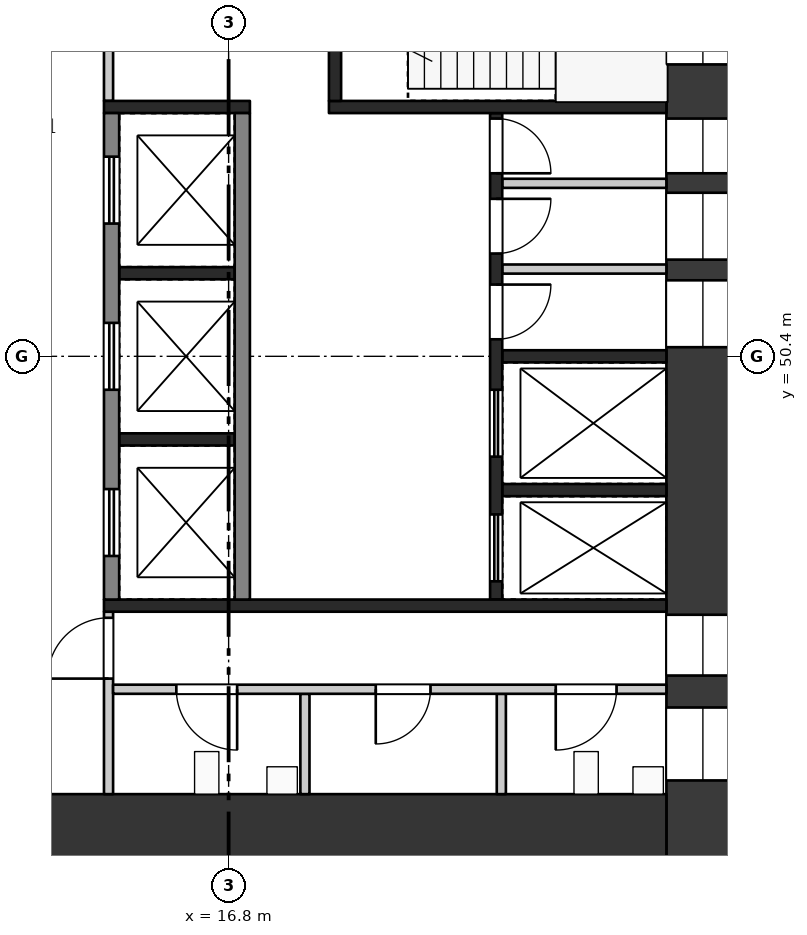
"""IFC4 building model, lengths in metres.
Left out: names, types, materials, properties, quantities, classifications, styles, units other than length and angle.
Written with IfcOpenShell. Run it as: python <this file> out.ifc"""

import sys

from ifc_helpers import new_model, si_unit, direction, frame, frame_2d, origin, place, context, subcontext, project, spatial, rectangle, extrude, element, fill, save


model = new_model("IFC4")
c1 = context("Model", 3, precision=1e-05, world=origin(), true_north=direction((0.0, 1.0)))
c2 = subcontext(c1, "Body", "Model", "MODEL_VIEW")
j1 = project(units=[si_unit("LENGTHUNIT", "METRE"), si_unit("PLANEANGLEUNIT", "RADIAN")], contexts=[c1])
p1 = place(None, origin())
s1 = spatial("IfcSite", under=j1, at=p1, CompositionType="ELEMENT")
p2 = place(p1, origin())
s2 = spatial("IfcBuilding", under=s1, at=p2, CompositionType="ELEMENT")
p3 = place(p2, frame((0.0, 0.0, 266.7)))
s3 = spatial("IfcBuildingStorey", under=s2, at=p3, CompositionType="ELEMENT", Elevation=266.7)
p4 = place(p3, frame((24.6, 58.8, 0.0), z_axis=(0.0, 0.0, 1.0), x_axis=(0.0, -1.0, 0.0)))
e1 = element("IfcWall", 1, at=p4, inside=s3, PredefinedType="SHEAR", context=c2, shape_type="SweptSolid", body=[
    extrude(rectangle(XDim=16.8, YDim=1.2, at=frame_2d((8.4, 0.0))), origin(), (0.0, 0.0, 1.0), 3.22),
])
p5 = place(p4, frame((1.8, 0.0, 0.5)))
e2 = element("IfcOpeningElement", 2, at=p5, cuts=e1, PredefinedType="OPENING", context=c2, shape_type="SweptSolid", body=[
    extrude(rectangle(XDim=1.8, YDim=2.4, at=frame_2d((0.9, 1.2))), frame((0.0, 0.61, 0.0), z_axis=(0.0, -1.0, 0.0), x_axis=(1.0, 0.0, 0.0)), (0.0, 0.0, 1.0), 1.22),
])
p6 = place(p4, frame((4.49, 0.0, 1.6)))
e3 = element("IfcOpeningElement", 3, at=p6, cuts=e1, PredefinedType="OPENING", context=c2, shape_type="SweptSolid", body=[
    extrude(rectangle(XDim=0.9, YDim=1.2, at=frame_2d((0.45, 0.6))), frame((0.0, 0.61, 0.0), z_axis=(0.0, -1.0, 0.0), x_axis=(1.0, 0.0, 0.0)), (0.0, 0.0, 1.0), 1.22),
])
p7 = place(p4, frame((5.71, 0.0, 1.6)))
e4 = element("IfcOpeningElement", 4, at=p7, cuts=e1, PredefinedType="OPENING", context=c2, shape_type="SweptSolid", body=[
    extrude(rectangle(XDim=1.1, YDim=1.2, at=frame_2d((0.55, 0.6))), frame((0.0, 0.61, 0.0), z_axis=(0.0, -1.0, 0.0), x_axis=(1.0, 0.0, 0.0)), (0.0, 0.0, 1.0), 1.22),
])
p8 = place(p4, frame((7.15, 0.0, 1.6)))
e5 = element("IfcOpeningElement", 5, at=p8, cuts=e1, PredefinedType="OPENING", context=c2, shape_type="SweptSolid", body=[
    extrude(rectangle(XDim=1.1, YDim=1.2, at=frame_2d((0.55, 0.6))), frame((0.0, 0.61, 0.0), z_axis=(0.0, -1.0, 0.0), x_axis=(1.0, 0.0, 0.0)), (0.0, 0.0, 1.0), 1.22),
])
p9 = place(p4, frame((12.65, 0.0, 0.6)))
e6 = element("IfcOpeningElement", 6, at=p9, cuts=e1, PredefinedType="OPENING", context=c2, shape_type="SweptSolid", body=[
    extrude(rectangle(XDim=1.0, YDim=2.1, at=frame_2d((0.5, 1.05))), frame((0.0, 0.61, 0.0), z_axis=(0.0, -1.0, 0.0), x_axis=(1.0, 0.0, 0.0)), (0.0, 0.0, 1.0), 1.22),
])
p10 = place(p4, frame((14.175, 0.0, 1.6)))
e7 = element("IfcOpeningElement", 7, at=p10, cuts=e1, PredefinedType="OPENING", context=c2, shape_type="SweptSolid", body=[
    extrude(rectangle(XDim=1.2, YDim=1.2, at=frame_2d((0.6, 0.6))), frame((0.0, 0.61, 0.0), z_axis=(0.0, -1.0, 0.0), x_axis=(1.0, 0.0, 0.0)), (0.0, 0.0, 1.0), 1.22),
])
p11 = place(p3, frame((9.6, 42.6, 0.0), z_axis=(0.0, 0.0, 1.0), x_axis=(1.0, 0.0, 0.0)))
e8 = element("IfcWall", 8, at=p11, inside=s3, PredefinedType="SHEAR", context=c2, shape_type="SweptSolid", body=[
    extrude(rectangle(XDim=14.4, YDim=1.2, at=frame_2d((7.2, 0.0))), origin(), (0.0, 0.0, 1.0), 3.22),
])
p12 = place(p11, frame((2.1, 0.0, 0.0)))
e9 = element("IfcOpeningElement", 9, at=p12, cuts=e8, PredefinedType="OPENING", context=c2, shape_type="SweptSolid", body=[
    extrude(rectangle(XDim=1.8, YDim=2.1, at=frame_2d((0.9, 1.05))), frame((0.0, 0.61, 0.0), z_axis=(0.0, -1.0, 0.0), x_axis=(1.0, 0.0, 0.0)), (0.0, 0.0, 1.0), 1.22),
])
for number, where, z_axis, x_axis in (
    (10, (15.0, 51.767, 0.0), (0.0, 0.0, 1.0), (1.0, 0.0, 0.0)),
    (11, (15.0, 49.033, 0.0), (0.0, 0.0, 1.0), (1.0, 0.0, 0.0)),
):
    element("IfcWall", number, at=place(p3, frame(where, z_axis=z_axis, x_axis=x_axis)), inside=s3, PredefinedType="SHEAR", context=c2, shape_type="SweptSolid", body=[
        extrude(rectangle(XDim=1.9, YDim=0.2, at=frame_2d((0.95, 0.0))), origin(), (0.0, 0.0, 1.0), 3.22),
    ])
p13 = place(p3, frame((14.875, 54.4, 0.0), z_axis=(0.0, 0.0, 1.0), x_axis=(0.0, -1.0, 0.0)))
e12 = element("IfcWall", 12, at=p13, inside=s3, PredefinedType="SHEAR", context=c2, shape_type="SweptSolid", body=[
    extrude(rectangle(XDim=8.0, YDim=0.25, at=frame_2d((4.0, 0.0))), origin(), (0.0, 0.0, 1.0), 3.22),
])
p14 = place(p13, frame((0.717, 0.0, 0.0)))
e13 = element("IfcOpeningElement", 13, at=p14, cuts=e12, PredefinedType="OPENING", context=c2, shape_type="SweptSolid", body=[
    extrude(rectangle(XDim=1.1, YDim=2.1, at=frame_2d((0.55, 1.05))), frame((0.0, 0.135, 0.0), z_axis=(0.0, -1.0, 0.0), x_axis=(1.0, 0.0, 0.0)), (0.0, 0.0, 1.0), 0.27),
])
p15 = place(p13, frame((3.45, 0.0, 0.0)))
e14 = element("IfcOpeningElement", 14, at=p15, cuts=e12, PredefinedType="OPENING", context=c2, shape_type="SweptSolid", body=[
    extrude(rectangle(XDim=1.1, YDim=2.1, at=frame_2d((0.55, 1.05))), frame((0.0, 0.135, 0.0), z_axis=(0.0, -1.0, 0.0), x_axis=(1.0, 0.0, 0.0)), (0.0, 0.0, 1.0), 0.27),
])
p16 = place(p13, frame((6.183, 0.0, 0.0)))
e15 = element("IfcOpeningElement", 15, at=p16, cuts=e12, PredefinedType="OPENING", context=c2, shape_type="SweptSolid", body=[
    extrude(rectangle(XDim=1.1, YDim=2.1, at=frame_2d((0.55, 1.05))), frame((0.0, 0.135, 0.0), z_axis=(0.0, -1.0, 0.0), x_axis=(1.0, 0.0, 0.0)), (0.0, 0.0, 1.0), 0.27),
])
p17 = place(p3, frame((17.025, 54.4, 0.0), z_axis=(0.0, 0.0, 1.0), x_axis=(0.0, -1.0, 0.0)))
e16 = element("IfcWall", 16, at=p17, inside=s3, PredefinedType="SHEAR", context=c2, shape_type="SweptSolid", body=[
    extrude(rectangle(XDim=8.0, YDim=0.25, at=frame_2d((4.0, 0.0))), origin(), (0.0, 0.0, 1.0), 3.22),
])
for number, where, z_axis, x_axis in (
    (17, (21.3, 50.4, 0.0), (0.0, 0.0, 1.0), (1.0, 0.0, 0.0)),
    (18, (21.3, 48.2, 0.0), (0.0, 0.0, 1.0), (1.0, 0.0, 0.0)),
):
    element("IfcWall", number, at=place(p3, frame(where, z_axis=z_axis, x_axis=x_axis)), inside=s3, PredefinedType="SHEAR", context=c2, shape_type="SweptSolid", body=[
        extrude(rectangle(XDim=2.7, YDim=0.2, at=frame_2d((1.35, 0.0))), origin(), (0.0, 0.0, 1.0), 3.22),
    ])
for number, where, z_axis, x_axis in (
    (19, (21.3, 53.245, 0.0), (0.0, 0.0, 1.0), (1.0, 0.0, 0.0)),
    (20, (21.3, 51.835, 0.0), (0.0, 0.0, 1.0), (1.0, 0.0, 0.0)),
):
    element("IfcWall", number, at=place(p3, frame(where, z_axis=z_axis, x_axis=x_axis)), inside=s3, PredefinedType="PARTITIONING", context=c2, shape_type="SweptSolid", body=[
        extrude(rectangle(XDim=2.7, YDim=0.15, at=frame_2d((1.35, 0.0))), origin(), (0.0, 0.0, 1.0), 3.22),
    ])
p18 = place(p3, frame((21.2, 54.4, 0.0), z_axis=(0.0, 0.0, 1.0), x_axis=(0.0, -1.0, 0.0)))
e21 = element("IfcWall", 21, at=p18, inside=s3, PredefinedType="SHEAR", context=c2, shape_type="SweptSolid", body=[
    extrude(rectangle(XDim=8.0, YDim=0.2, at=frame_2d((4.0, 0.0))), origin(), (0.0, 0.0, 1.0), 3.22),
])
p19 = place(p18, frame((0.09, 0.0, 0.0)))
e22 = element("IfcOpeningElement", 22, at=p19, cuts=e21, PredefinedType="OPENING", context=c2, shape_type="SweptSolid", body=[
    extrude(rectangle(XDim=0.9, YDim=2.1, at=frame_2d((0.45, 1.05))), frame((0.0, 0.11, 0.0), z_axis=(0.0, -1.0, 0.0), x_axis=(1.0, 0.0, 0.0)), (0.0, 0.0, 1.0), 0.22),
])
p20 = place(p18, frame((1.41, 0.0, 0.0)))
e23 = element("IfcOpeningElement", 23, at=p20, cuts=e21, PredefinedType="OPENING", context=c2, shape_type="SweptSolid", body=[
    extrude(rectangle(XDim=0.9, YDim=2.1, at=frame_2d((0.45, 1.05))), frame((0.0, 0.11, 0.0), z_axis=(0.0, -1.0, 0.0), x_axis=(1.0, 0.0, 0.0)), (0.0, 0.0, 1.0), 0.22),
])
p21 = place(p18, frame((2.82, 0.0, 0.0)))
e24 = element("IfcOpeningElement", 24, at=p21, cuts=e21, PredefinedType="OPENING", context=c2, shape_type="SweptSolid", body=[
    extrude(rectangle(XDim=0.9, YDim=2.1, at=frame_2d((0.45, 1.05))), frame((0.0, 0.11, 0.0), z_axis=(0.0, -1.0, 0.0), x_axis=(1.0, 0.0, 0.0)), (0.0, 0.0, 1.0), 0.22),
])
p22 = place(p18, frame((4.55, 0.0, 0.0)))
e25 = element("IfcOpeningElement", 25, at=p22, cuts=e21, PredefinedType="OPENING", context=c2, shape_type="SweptSolid", body=[
    extrude(rectangle(XDim=1.1, YDim=2.1, at=frame_2d((0.55, 1.05))), frame((0.0, 0.11, 0.0), z_axis=(0.0, -1.0, 0.0), x_axis=(1.0, 0.0, 0.0)), (0.0, 0.0, 1.0), 0.22),
])
p23 = place(p18, frame((6.6, 0.0, 0.0)))
e26 = element("IfcOpeningElement", 26, at=p23, cuts=e21, PredefinedType="OPENING", context=c2, shape_type="SweptSolid", body=[
    extrude(rectangle(XDim=1.1, YDim=2.1, at=frame_2d((0.55, 1.05))), frame((0.0, 0.11, 0.0), z_axis=(0.0, -1.0, 0.0), x_axis=(1.0, 0.0, 0.0)), (0.0, 0.0, 1.0), 0.22),
])
p24 = place(p3, frame((14.75, 54.5, 0.0), z_axis=(0.0, 0.0, 1.0), x_axis=(1.0, 0.0, 0.0)))
e27 = element("IfcWall", 27, at=p24, inside=s3, PredefinedType="SHEAR", context=c2, shape_type="SweptSolid", body=[
    extrude(rectangle(XDim=2.4, YDim=0.2, at=frame_2d((1.2, 0.0))), origin(), (0.0, 0.0, 1.0), 3.22),
])
p25 = place(p3, frame((18.45, 54.5, 0.0), z_axis=(0.0, 0.0, 1.0), x_axis=(1.0, 0.0, 0.0)))
e28 = element("IfcWall", 28, at=p25, inside=s3, PredefinedType="SHEAR", context=c2, shape_type="SweptSolid", body=[
    extrude(rectangle(XDim=5.55, YDim=0.2, at=frame_2d((2.775, 0.0))), origin(), (0.0, 0.0, 1.0), 3.22),
])
p26 = place(p3, frame((14.825, 57.6, 0.0), z_axis=(0.0, 0.0, 1.0), x_axis=(0.0, -1.0, 0.0)))
e29 = element("IfcWall", 29, at=p26, inside=s3, PredefinedType="PARTITIONING", context=c2, shape_type="SweptSolid", body=[
    extrude(rectangle(XDim=3.0, YDim=0.15, at=frame_2d((1.5, 0.0))), origin(), (0.0, 0.0, 1.0), 3.22),
])
p27 = place(p26, frame((1.0, 0.0, 0.0)))
e30 = element("IfcOpeningElement", 30, at=p27, cuts=e29, PredefinedType="OPENING", context=c2, shape_type="SweptSolid", body=[
    extrude(rectangle(XDim=1.0, YDim=2.1, at=frame_2d((0.5, 1.05))), frame((0.0, 0.085, 0.0), z_axis=(0.0, -1.0, 0.0), x_axis=(1.0, 0.0, 0.0)), (0.0, 0.0, 1.0), 0.17),
])
p28 = place(p3, frame((18.55, 57.6, 0.0), z_axis=(0.0, 0.0, 1.0), x_axis=(0.0, -1.0, 0.0)))
e31 = element("IfcWall", 31, at=p28, inside=s3, PredefinedType="SHEAR", context=c2, shape_type="SweptSolid", body=[
    extrude(rectangle(XDim=3.0, YDim=0.2, at=frame_2d((1.5, 0.0))), origin(), (0.0, 0.0, 1.0), 3.22),
])
p29 = place(p28, frame((1.0, 0.0, 0.0)))
e32 = element("IfcOpeningElement", 32, at=p29, cuts=e31, PredefinedType="OPENING", context=c2, shape_type="SweptSolid", body=[
    extrude(rectangle(XDim=1.0, YDim=2.1, at=frame_2d((0.5, 1.05))), frame((0.0, 0.11, 0.0), z_axis=(0.0, -1.0, 0.0), x_axis=(1.0, 0.0, 0.0)), (0.0, 0.0, 1.0), 0.22),
])
p30 = place(p3, frame((14.75, 46.3, 0.0), z_axis=(0.0, 0.0, 1.0), x_axis=(1.0, 0.0, 0.0)))
e33 = element("IfcWall", 33, at=p30, inside=s3, PredefinedType="SHEAR", context=c2, shape_type="SweptSolid", body=[
    extrude(rectangle(XDim=9.25, YDim=0.2, at=frame_2d((4.625, 0.0))), origin(), (0.0, 0.0, 1.0), 3.22),
])
p31 = place(p3, frame((14.825, 46.2, 0.0), z_axis=(0.0, 0.0, 1.0), x_axis=(0.0, -1.0, 0.0)))
e34 = element("IfcWall", 34, at=p31, inside=s3, PredefinedType="PARTITIONING", context=c2, shape_type="SweptSolid", body=[
    extrude(rectangle(XDim=3.0, YDim=0.15, at=frame_2d((1.5, 0.0))), origin(), (0.0, 0.0, 1.0), 3.22),
])
p32 = place(p31, frame((0.1, 0.0, 0.0)))
e35 = element("IfcOpeningElement", 35, at=p32, cuts=e34, PredefinedType="OPENING", context=c2, shape_type="SweptSolid", body=[
    extrude(rectangle(XDim=1.0, YDim=2.1, at=frame_2d((0.5, 1.05))), frame((0.0, 0.085, 0.0), z_axis=(0.0, -1.0, 0.0), x_axis=(1.0, 0.0, 0.0)), (0.0, 0.0, 1.0), 0.17),
])
for number, where, z_axis, x_axis in (
    (36, (18.055, 44.85, 0.0), (0.0, 0.0, 1.0), (0.0, -1.0, 0.0)),
    (37, (21.285, 44.85, 0.0), (0.0, 0.0, 1.0), (0.0, -1.0, 0.0)),
):
    element("IfcWall", number, at=place(p3, frame(where, z_axis=z_axis, x_axis=x_axis)), inside=s3, PredefinedType="PARTITIONING", context=c2, shape_type="SweptSolid", body=[
        extrude(rectangle(XDim=1.65, YDim=0.15, at=frame_2d((0.825, 0.0))), origin(), (0.0, 0.0, 1.0), 3.22),
    ])
p33 = place(p3, frame((14.9, 44.925, 0.0), z_axis=(0.0, 0.0, 1.0), x_axis=(1.0, 0.0, 0.0)))
e38 = element("IfcWall", 38, at=p33, inside=s3, PredefinedType="PARTITIONING", context=c2, shape_type="SweptSolid", body=[
    extrude(rectangle(XDim=9.1, YDim=0.15, at=frame_2d((4.55, 0.0))), origin(), (0.0, 0.0, 1.0), 3.22),
])
p34 = place(p33, frame((1.04, 0.0, 0.0)))
e39 = element("IfcOpeningElement", 39, at=p34, cuts=e38, PredefinedType="OPENING", context=c2, shape_type="SweptSolid", body=[
    extrude(rectangle(XDim=1.0, YDim=2.1, at=frame_2d((0.5, 1.05))), frame((0.0, 0.085, 0.0), z_axis=(0.0, -1.0, 0.0), x_axis=(1.0, 0.0, 0.0)), (0.0, 0.0, 1.0), 0.17),
])
p35 = place(p33, frame((4.32, 0.0, 0.0)))
e40 = element("IfcOpeningElement", 40, at=p35, cuts=e38, PredefinedType="OPENING", context=c2, shape_type="SweptSolid", body=[
    extrude(rectangle(XDim=0.9, YDim=2.1, at=frame_2d((0.45, 1.05))), frame((0.0, 0.085, 0.0), z_axis=(0.0, -1.0, 0.0), x_axis=(1.0, 0.0, 0.0)), (0.0, 0.0, 1.0), 0.17),
])
p36 = place(p33, frame((7.28, 0.0, 0.0)))
e41 = element("IfcOpeningElement", 41, at=p36, cuts=e38, PredefinedType="OPENING", context=c2, shape_type="SweptSolid", body=[
    extrude(rectangle(XDim=1.0, YDim=2.1, at=frame_2d((0.5, 1.05))), frame((0.0, 0.085, 0.0), z_axis=(0.0, -1.0, 0.0), x_axis=(1.0, 0.0, 0.0)), (0.0, 0.0, 1.0), 0.17),
])
p37 = place(p14, origin())
e42 = element("IfcDoor", 42, at=p37, inside=s3, OperationType="DOUBLE_DOOR_SLIDING", PredefinedType="DOOR", context=c2, shape_type="SweptSolid", body=[
    extrude(rectangle(XDim=1.1, YDim=2.1, at=frame_2d((0.55, 1.05))), frame((0.0, 0.025, 0.0), z_axis=(0.0, -1.0, 0.0), x_axis=(1.0, 0.0, 0.0)), (0.0, 0.0, 1.0), 0.05),
])
fill(e13, e42)
p38 = place(p15, origin())
e43 = element("IfcDoor", 43, at=p38, inside=s3, OperationType="DOUBLE_DOOR_SLIDING", PredefinedType="DOOR", context=c2, shape_type="SweptSolid", body=[
    extrude(rectangle(XDim=1.1, YDim=2.1, at=frame_2d((0.55, 1.05))), frame((0.0, 0.025, 0.0), z_axis=(0.0, -1.0, 0.0), x_axis=(1.0, 0.0, 0.0)), (0.0, 0.0, 1.0), 0.05),
])
fill(e14, e43)
p39 = place(p16, origin())
e44 = element("IfcDoor", 44, at=p39, inside=s3, OperationType="DOUBLE_DOOR_SLIDING", PredefinedType="DOOR", context=c2, shape_type="SweptSolid", body=[
    extrude(rectangle(XDim=1.1, YDim=2.1, at=frame_2d((0.55, 1.05))), frame((0.0, 0.025, 0.0), z_axis=(0.0, -1.0, 0.0), x_axis=(1.0, 0.0, 0.0)), (0.0, 0.0, 1.0), 0.05),
])
fill(e15, e44)
p40 = place(p19, origin())
e45 = element("IfcDoor", 45, at=p40, inside=s3, OperationType="SINGLE_SWING_RIGHT", PredefinedType="DOOR", context=c2, shape_type="SweptSolid", body=[
    extrude(rectangle(XDim=0.9, YDim=2.1, at=frame_2d((0.45, 1.05))), frame((0.0, 0.025, 0.0), z_axis=(0.0, -1.0, 0.0), x_axis=(1.0, 0.0, 0.0)), (0.0, 0.0, 1.0), 0.05),
])
fill(e22, e45)
p41 = place(p20, origin())
e46 = element("IfcDoor", 46, at=p41, inside=s3, OperationType="SINGLE_SWING_LEFT", PredefinedType="DOOR", context=c2, shape_type="SweptSolid", body=[
    extrude(rectangle(XDim=0.9, YDim=2.1, at=frame_2d((0.45, 1.05))), frame((0.0, 0.025, 0.0), z_axis=(0.0, -1.0, 0.0), x_axis=(1.0, 0.0, 0.0)), (0.0, 0.0, 1.0), 0.05),
])
fill(e23, e46)
p42 = place(p21, origin())
e47 = element("IfcDoor", 47, at=p42, inside=s3, OperationType="SINGLE_SWING_LEFT", PredefinedType="DOOR", context=c2, shape_type="SweptSolid", body=[
    extrude(rectangle(XDim=0.9, YDim=2.1, at=frame_2d((0.45, 1.05))), frame((0.0, 0.025, 0.0), z_axis=(0.0, -1.0, 0.0), x_axis=(1.0, 0.0, 0.0)), (0.0, 0.0, 1.0), 0.05),
])
fill(e24, e47)
p43 = place(p22, origin())
e48 = element("IfcDoor", 48, at=p43, inside=s3, OperationType="DOUBLE_DOOR_SLIDING", PredefinedType="DOOR", context=c2, shape_type="SweptSolid", body=[
    extrude(rectangle(XDim=1.1, YDim=2.1, at=frame_2d((0.55, 1.05))), frame((0.0, 0.025, 0.0), z_axis=(0.0, -1.0, 0.0), x_axis=(1.0, 0.0, 0.0)), (0.0, 0.0, 1.0), 0.05),
])
fill(e25, e48)
p44 = place(p23, origin())
e49 = element("IfcDoor", 49, at=p44, inside=s3, OperationType="DOUBLE_DOOR_SLIDING", PredefinedType="DOOR", context=c2, shape_type="SweptSolid", body=[
    extrude(rectangle(XDim=1.1, YDim=2.1, at=frame_2d((0.55, 1.05))), frame((0.0, 0.025, 0.0), z_axis=(0.0, -1.0, 0.0), x_axis=(1.0, 0.0, 0.0)), (0.0, 0.0, 1.0), 0.05),
])
fill(e26, e49)
p45 = place(p32, frame((1.0, 0.0, 0.0), z_axis=(0.0, 0.0, 1.0), x_axis=(-1.0, 0.0, 0.0)))
e50 = element("IfcDoor", 50, at=p45, inside=s3, OperationType="SINGLE_SWING_LEFT", PredefinedType="DOOR", context=c2, shape_type="SweptSolid", body=[
    extrude(rectangle(XDim=1.0, YDim=2.1, at=frame_2d((0.5, 1.05))), frame((0.0, 0.025, 0.0), z_axis=(0.0, -1.0, 0.0), x_axis=(1.0, 0.0, 0.0)), (0.0, 0.0, 1.0), 0.05),
])
fill(e35, e50)
p46 = place(p34, frame((1.0, 0.0, 0.0), z_axis=(0.0, 0.0, 1.0), x_axis=(-1.0, 0.0, 0.0)))
e51 = element("IfcDoor", 51, at=p46, inside=s3, OperationType="SINGLE_SWING_LEFT", PredefinedType="DOOR", context=c2, shape_type="SweptSolid", body=[
    extrude(rectangle(XDim=1.0, YDim=2.1, at=frame_2d((0.5, 1.05))), frame((0.0, 0.025, 0.0), z_axis=(0.0, -1.0, 0.0), x_axis=(1.0, 0.0, 0.0)), (0.0, 0.0, 1.0), 0.05),
])
fill(e39, e51)
p47 = place(p35, frame((0.9, 0.0, 0.0), z_axis=(0.0, 0.0, 1.0), x_axis=(-1.0, 0.0, 0.0)))
e52 = element("IfcDoor", 52, at=p47, inside=s3, OperationType="SINGLE_SWING_RIGHT", PredefinedType="DOOR", context=c2, shape_type="SweptSolid", body=[
    extrude(rectangle(XDim=0.9, YDim=2.1, at=frame_2d((0.45, 1.05))), frame((0.0, 0.025, 0.0), z_axis=(0.0, -1.0, 0.0), x_axis=(1.0, 0.0, 0.0)), (0.0, 0.0, 1.0), 0.05),
])
fill(e40, e52)
p48 = place(p36, frame((1.0, 0.0, 0.0), z_axis=(0.0, 0.0, 1.0), x_axis=(-1.0, 0.0, 0.0)))
e53 = element("IfcDoor", 53, at=p48, inside=s3, OperationType="SINGLE_SWING_RIGHT", PredefinedType="DOOR", context=c2, shape_type="SweptSolid", body=[
    extrude(rectangle(XDim=1.0, YDim=2.1, at=frame_2d((0.5, 1.05))), frame((0.0, 0.025, 0.0), z_axis=(0.0, -1.0, 0.0), x_axis=(1.0, 0.0, 0.0)), (0.0, 0.0, 1.0), 0.05),
])
fill(e41, e53)
p49 = place(p5, origin())
e54 = element("IfcWindow", 54, at=p49, inside=s3, PartitioningType="SINGLE_PANEL", PredefinedType="WINDOW", context=c2, shape_type="SweptSolid", body=[
    extrude(rectangle(XDim=1.8, YDim=2.4, at=frame_2d((0.9, 1.2))), frame((0.0, 0.03, 0.0), z_axis=(0.0, -1.0, 0.0), x_axis=(1.0, 0.0, 0.0)), (0.0, 0.0, 1.0), 0.06),
])
fill(e2, e54)
p50 = place(p6, origin())
e55 = element("IfcWindow", 55, at=p50, inside=s3, PartitioningType="SINGLE_PANEL", PredefinedType="WINDOW", context=c2, shape_type="SweptSolid", body=[
    extrude(rectangle(XDim=0.9, YDim=1.2, at=frame_2d((0.45, 0.6))), frame((0.0, 0.03, 0.0), z_axis=(0.0, -1.0, 0.0), x_axis=(1.0, 0.0, 0.0)), (0.0, 0.0, 1.0), 0.06),
])
fill(e3, e55)
p51 = place(p7, origin())
e56 = element("IfcWindow", 56, at=p51, inside=s3, PartitioningType="SINGLE_PANEL", PredefinedType="WINDOW", context=c2, shape_type="SweptSolid", body=[
    extrude(rectangle(XDim=1.1, YDim=1.2, at=frame_2d((0.55, 0.6))), frame((0.0, 0.03, 0.0), z_axis=(0.0, -1.0, 0.0), x_axis=(1.0, 0.0, 0.0)), (0.0, 0.0, 1.0), 0.06),
])
fill(e4, e56)
p52 = place(p8, origin())
e57 = element("IfcWindow", 57, at=p52, inside=s3, PartitioningType="SINGLE_PANEL", PredefinedType="WINDOW", context=c2, shape_type="SweptSolid", body=[
    extrude(rectangle(XDim=1.1, YDim=1.2, at=frame_2d((0.55, 0.6))), frame((0.0, 0.03, 0.0), z_axis=(0.0, -1.0, 0.0), x_axis=(1.0, 0.0, 0.0)), (0.0, 0.0, 1.0), 0.06),
])
fill(e5, e57)
p53 = place(p9, origin())
e58 = element("IfcWindow", 58, at=p53, inside=s3, PartitioningType="SINGLE_PANEL", PredefinedType="WINDOW", context=c2, shape_type="SweptSolid", body=[
    extrude(rectangle(XDim=1.0, YDim=2.1, at=frame_2d((0.5, 1.05))), frame((0.0, 0.03, 0.0), z_axis=(0.0, -1.0, 0.0), x_axis=(1.0, 0.0, 0.0)), (0.0, 0.0, 1.0), 0.06),
])
fill(e6, e58)
p54 = place(p10, origin())
e59 = element("IfcWindow", 59, at=p54, inside=s3, PartitioningType="SINGLE_PANEL", PredefinedType="WINDOW", context=c2, shape_type="SweptSolid", body=[
    extrude(rectangle(XDim=1.2, YDim=1.2, at=frame_2d((0.6, 0.6))), frame((0.0, 0.03, 0.0), z_axis=(0.0, -1.0, 0.0), x_axis=(1.0, 0.0, 0.0)), (0.0, 0.0, 1.0), 0.06),
])
fill(e7, e59)
save(model, sys.argv[1])
